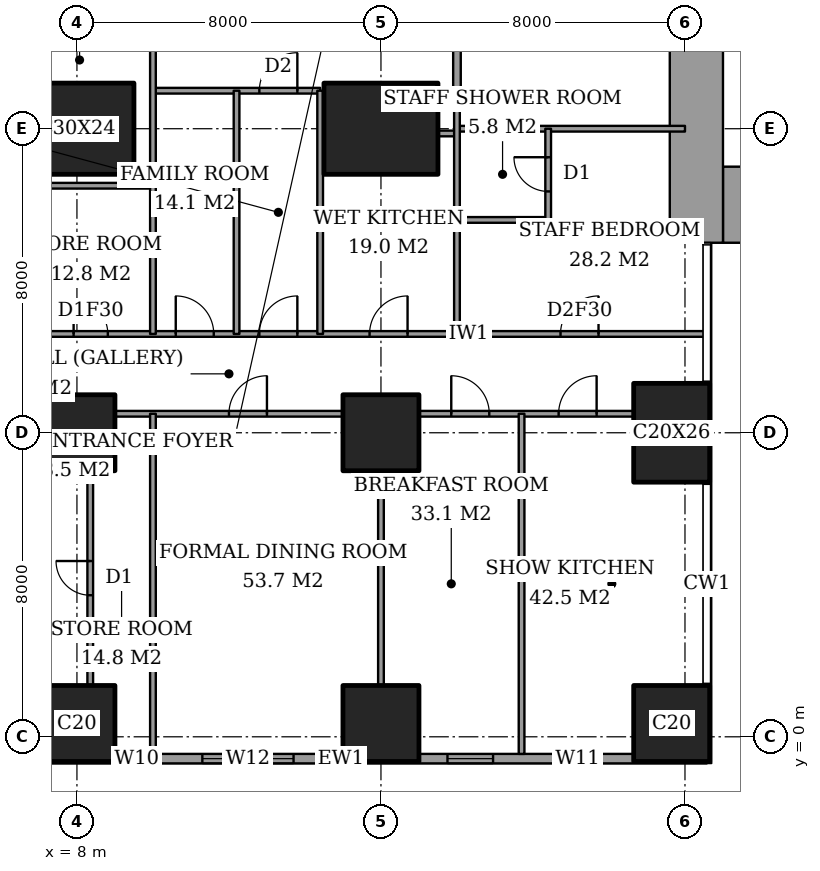
"""IFC4 building model, lengths in metres.
Left out: names, types, materials, properties, quantities, classifications, styles, units other than length and angle.
Written with IfcOpenShell. Run it as: python <this file> out.ifc"""

import sys

from ifc_helpers import new_model, si_unit, direction, frame, frame_2d, origin, origin_2d, place, context, subcontext, project, spatial, rectangle, extrude, element, fill, save


model = new_model("IFC4")
c1 = context("Model", 3, precision=1e-05, world=origin(), true_north=direction((0.0, 1.0)))
c2 = subcontext(c1, "Body", "Model", "MODEL_VIEW")
j1 = project(units=[si_unit("LENGTHUNIT", "METRE"), si_unit("PLANEANGLEUNIT", "RADIAN")], contexts=[c1])
p1 = place(None, origin())
s1 = spatial("IfcSite", under=j1, at=p1, CompositionType="ELEMENT")
p2 = place(p1, origin())
s2 = spatial("IfcBuilding", under=s1, at=p2, CompositionType="ELEMENT")
p3 = place(p2, frame((0.0, 0.0, 125.0)))
s3 = spatial("IfcBuildingStorey", under=s2, at=p3, CompositionType="ELEMENT", Elevation=125.0)
for number, where, z_axis, x_axis in (
    (1, (8.0, 0.35, 0.0), (0.0, 0.0, 1.0), (1.0, 0.0, 0.0)),
    (2, (8.0, 8.0, 0.0), (0.0, 0.0, 1.0), (1.0, 0.0, 0.0)),
):
    element("IfcColumn", number, at=place(p3, frame(where, z_axis=z_axis, x_axis=x_axis)), inside=s3, PredefinedType="COLUMN", context=c2, shape_type="SweptSolid", body=[
        extrude(rectangle(XDim=2.0, YDim=2.0, at=origin_2d()), origin(), (0.0, 0.0, 1.0), 3.6),
    ])
p4 = place(p3, frame((8.0, 16.0, 0.0), z_axis=(0.0, 0.0, 1.0), x_axis=(1.0, 0.0, 0.0)))
e3 = element("IfcColumn", 3, at=p4, inside=s3, PredefinedType="COLUMN", context=c2, shape_type="SweptSolid", body=[
    extrude(rectangle(XDim=3.0, YDim=2.4, at=origin_2d()), origin(), (0.0, 0.0, 1.0), 3.6),
])
for number, where, z_axis, x_axis in (
    (4, (16.0, 0.35, 0.0), (0.0, 0.0, 1.0), (1.0, 0.0, 0.0)),
    (5, (16.0, 8.0, 0.0), (0.0, 0.0, 1.0), (1.0, 0.0, 0.0)),
):
    element("IfcColumn", number, at=place(p3, frame(where, z_axis=z_axis, x_axis=x_axis)), inside=s3, PredefinedType="COLUMN", context=c2, shape_type="SweptSolid", body=[
        extrude(rectangle(XDim=2.0, YDim=2.0, at=origin_2d()), origin(), (0.0, 0.0, 1.0), 3.6),
    ])
p5 = place(p3, frame((16.0, 16.0, 0.0), z_axis=(0.0, 0.0, 1.0), x_axis=(1.0, 0.0, 0.0)))
e6 = element("IfcColumn", 6, at=p5, inside=s3, PredefinedType="COLUMN", context=c2, shape_type="SweptSolid", body=[
    extrude(rectangle(XDim=3.0, YDim=2.4, at=origin_2d()), origin(), (0.0, 0.0, 1.0), 3.6),
])
p6 = place(p3, frame((23.65, 0.35, 0.0), z_axis=(0.0, 0.0, 1.0), x_axis=(1.0, 0.0, 0.0)))
e7 = element("IfcColumn", 7, at=p6, inside=s3, PredefinedType="COLUMN", context=c2, shape_type="SweptSolid", body=[
    extrude(rectangle(XDim=2.0, YDim=2.0, at=origin_2d()), origin(), (0.0, 0.0, 1.0), 3.6),
])
p7 = place(p3, frame((23.65, 8.0, 0.0), z_axis=(0.0, 0.0, 1.0), x_axis=(1.0, 0.0, 0.0)))
e8 = element("IfcColumn", 8, at=p7, inside=s3, PredefinedType="COLUMN", context=c2, shape_type="SweptSolid", body=[
    extrude(rectangle(XDim=2.0, YDim=2.6, at=origin_2d()), origin(), (0.0, 0.0, 1.0), 3.6),
])
p8 = place(p3, frame((25.0, 14.0, 0.0), z_axis=(0.0, 0.0, 1.0), x_axis=(1.0, 0.0, 0.0)))
e9 = element("IfcWall", 9, at=p8, inside=s3, PredefinedType="SHEAR", context=c2, shape_type="SweptSolid", body=[
    extrude(rectangle(XDim=3.15, YDim=2.0, at=frame_2d((1.575, 0.0))), origin(), (0.0, 0.0, 1.0), 3.6),
])
p9 = place(p3, frame((24.3, 13.0, 0.0), z_axis=(0.0, 0.0, 1.0), x_axis=(0.0, 1.0, 0.0)))
e10 = element("IfcWall", 10, at=p9, inside=s3, PredefinedType="SHEAR", context=c2, shape_type="SweptSolid", body=[
    extrude(rectangle(XDim=10.15, YDim=1.4, at=frame_2d((5.075, 0.0))), origin(), (0.0, 0.0, 1.0), 3.6),
])
p10 = place(p3, frame((3.175, -0.575, 0.0), z_axis=(0.0, 0.0, 1.0), x_axis=(1.0, 0.0, 0.0)))
e11 = element("IfcWall", 11, at=p10, inside=s3, PredefinedType="SOLIDWALL", context=c2, shape_type="SweptSolid", body=[
    extrude(rectangle(XDim=21.4, YDim=0.25, at=frame_2d((10.7, 0.0))), origin(), (0.0, 0.0, 1.0), 3.6),
])
p11 = place(p10, frame((0.775, 0.0, 0.4)))
e12 = element("IfcOpeningElement", 12, at=p11, cuts=e11, PredefinedType="OPENING", context=c2, shape_type="SweptSolid", body=[
    extrude(rectangle(XDim=2.4, YDim=2.2, at=frame_2d((1.2, 1.1))), frame((0.0, 0.135, 0.0), z_axis=(0.0, -1.0, 0.0), x_axis=(1.0, 0.0, 0.0)), (0.0, 0.0, 1.0), 0.27),
])
p12 = place(p10, frame((6.1, 0.0, 0.4)))
e13 = element("IfcOpeningElement", 13, at=p12, cuts=e11, PredefinedType="OPENING", context=c2, shape_type="SweptSolid", body=[
    extrude(rectangle(XDim=0.6, YDim=2.2, at=frame_2d((0.3, 1.1))), frame((0.0, 0.135, 0.0), z_axis=(0.0, -1.0, 0.0), x_axis=(1.0, 0.0, 0.0)), (0.0, 0.0, 1.0), 0.27),
])
p13 = place(p10, frame((8.125, 0.0, 0.4)))
e14 = element("IfcOpeningElement", 14, at=p13, cuts=e11, PredefinedType="OPENING", context=c2, shape_type="SweptSolid", body=[
    extrude(rectangle(XDim=2.4, YDim=2.2, at=frame_2d((1.2, 1.1))), frame((0.0, 0.135, 0.0), z_axis=(0.0, -1.0, 0.0), x_axis=(1.0, 0.0, 0.0)), (0.0, 0.0, 1.0), 0.27),
])
p14 = place(p10, frame((14.575, 0.0, 0.4)))
e15 = element("IfcOpeningElement", 15, at=p14, cuts=e11, PredefinedType="OPENING", context=c2, shape_type="SweptSolid", body=[
    extrude(rectangle(XDim=1.2, YDim=2.2, at=frame_2d((0.6, 1.1))), frame((0.0, 0.135, 0.0), z_axis=(0.0, -1.0, 0.0), x_axis=(1.0, 0.0, 0.0)), (0.0, 0.0, 1.0), 0.27),
])
p15 = place(p10, frame((17.4, 0.0, 0.4)))
e16 = element("IfcOpeningElement", 16, at=p15, cuts=e11, PredefinedType="OPENING", context=c2, shape_type="SweptSolid", body=[
    extrude(rectangle(XDim=1.2, YDim=2.2, at=frame_2d((0.6, 1.1))), frame((0.0, 0.135, 0.0), z_axis=(0.0, -1.0, 0.0), x_axis=(1.0, 0.0, 0.0)), (0.0, 0.0, 1.0), 0.27),
])
p16 = place(p3, frame((9.0, 8.5, 0.0), z_axis=(0.0, 0.0, 1.0), x_axis=(1.0, 0.0, 0.0)))
e17 = element("IfcWall", 17, at=p16, inside=s3, PredefinedType="PARTITIONING", context=c2, shape_type="SweptSolid", body=[
    extrude(rectangle(XDim=6.0, YDim=0.15, at=frame_2d((3.0, 0.0))), origin(), (0.0, 0.0, 1.0), 3.35),
])
p17 = place(p16, frame((3.0, 0.0, 0.0)))
e18 = element("IfcOpeningElement", 18, at=p17, cuts=e17, PredefinedType="OPENING", context=c2, shape_type="SweptSolid", body=[
    extrude(rectangle(XDim=1.0, YDim=2.1, at=frame_2d((0.5, 1.05))), frame((0.0, 0.085, 0.0), z_axis=(0.0, -1.0, 0.0), x_axis=(1.0, 0.0, 0.0)), (0.0, 0.0, 1.0), 0.17),
])
p18 = place(p3, frame((17.0, 8.5, 0.0), z_axis=(0.0, 0.0, 1.0), x_axis=(1.0, 0.0, 0.0)))
e19 = element("IfcWall", 19, at=p18, inside=s3, PredefinedType="PARTITIONING", context=c2, shape_type="SweptSolid", body=[
    extrude(rectangle(XDim=5.65, YDim=0.15, at=frame_2d((2.825, 0.0))), origin(), (0.0, 0.0, 1.0), 3.35),
])
p19 = place(p18, frame((0.85, 0.0, 0.0)))
e20 = element("IfcOpeningElement", 20, at=p19, cuts=e19, PredefinedType="OPENING", context=c2, shape_type="SweptSolid", body=[
    extrude(rectangle(XDim=1.0, YDim=2.1, at=frame_2d((0.5, 1.05))), frame((0.0, 0.085, 0.0), z_axis=(0.0, -1.0, 0.0), x_axis=(1.0, 0.0, 0.0)), (0.0, 0.0, 1.0), 0.17),
])
p20 = place(p18, frame((3.675, 0.0, 0.0)))
e21 = element("IfcOpeningElement", 21, at=p20, cuts=e19, PredefinedType="OPENING", context=c2, shape_type="SweptSolid", body=[
    extrude(rectangle(XDim=1.0, YDim=2.1, at=frame_2d((0.5, 1.05))), frame((0.0, 0.085, 0.0), z_axis=(0.0, -1.0, 0.0), x_axis=(1.0, 0.0, 0.0)), (0.0, 0.0, 1.0), 0.17),
])
p21 = place(p3, frame((-0.45, 10.6, 0.0), z_axis=(0.0, 0.0, 1.0), x_axis=(1.0, 0.0, 0.0)))
e22 = element("IfcWall", 22, at=p21, inside=s3, PredefinedType="PARTITIONING", context=c2, shape_type="SweptSolid", body=[
    extrude(rectangle(XDim=25.011, YDim=0.15, at=frame_2d((12.505, 0.0))), origin(), (0.0, 0.0, 1.0), 3.35),
])
p22 = place(p21, frame((13.25, 0.0, 0.0)))
e23 = element("IfcOpeningElement", 23, at=p22, cuts=e22, PredefinedType="OPENING", context=c2, shape_type="SweptSolid", body=[
    extrude(rectangle(XDim=1.0, YDim=2.1, at=frame_2d((0.5, 1.05))), frame((0.0, 0.085, 0.0), z_axis=(0.0, -1.0, 0.0), x_axis=(1.0, 0.0, 0.0)), (0.0, 0.0, 1.0), 0.17),
])
p23 = place(p21, frame((3.087, 0.0, 0.0)))
e24 = element("IfcOpeningElement", 24, at=p23, cuts=e22, PredefinedType="OPENING", context=c2, shape_type="SweptSolid", body=[
    extrude(rectangle(XDim=1.0, YDim=2.1, at=frame_2d((0.5, 1.05))), frame((0.0, 0.085, 0.0), z_axis=(0.0, -1.0, 0.0), x_axis=(1.0, 0.0, 0.0)), (0.0, 0.0, 1.0), 0.17),
])
p24 = place(p21, frame((8.363, 0.0, 0.0)))
e25 = element("IfcOpeningElement", 25, at=p24, cuts=e22, PredefinedType="OPENING", context=c2, shape_type="SweptSolid", body=[
    extrude(rectangle(XDim=0.9, YDim=2.1, at=frame_2d((0.45, 1.05))), frame((0.0, 0.085, 0.0), z_axis=(0.0, -1.0, 0.0), x_axis=(1.0, 0.0, 0.0)), (0.0, 0.0, 1.0), 0.17),
])
p25 = place(p21, frame((11.05, 0.0, 0.0)))
e26 = element("IfcOpeningElement", 26, at=p25, cuts=e22, PredefinedType="OPENING", context=c2, shape_type="SweptSolid", body=[
    extrude(rectangle(XDim=1.0, YDim=2.1, at=frame_2d((0.5, 1.05))), frame((0.0, 0.085, 0.0), z_axis=(0.0, -1.0, 0.0), x_axis=(1.0, 0.0, 0.0)), (0.0, 0.0, 1.0), 0.17),
])
p26 = place(p21, frame((16.15, 0.0, 0.0)))
e27 = element("IfcOpeningElement", 27, at=p26, cuts=e22, PredefinedType="OPENING", context=c2, shape_type="SweptSolid", body=[
    extrude(rectangle(XDim=1.0, YDim=2.1, at=frame_2d((0.5, 1.05))), frame((0.0, 0.085, 0.0), z_axis=(0.0, -1.0, 0.0), x_axis=(1.0, 0.0, 0.0)), (0.0, 0.0, 1.0), 0.17),
])
p27 = place(p21, frame((21.175, 0.0, 0.0)))
e28 = element("IfcOpeningElement", 28, at=p27, cuts=e22, PredefinedType="OPENING", context=c2, shape_type="SweptSolid", body=[
    extrude(rectangle(XDim=1.0, YDim=2.1, at=frame_2d((0.5, 1.05))), frame((0.0, 0.085, 0.0), z_axis=(0.0, -1.0, 0.0), x_axis=(1.0, 0.0, 0.0)), (0.0, 0.0, 1.0), 0.17),
])
p28 = place(p3, frame((18.0, 13.6, 0.0), z_axis=(0.0, 0.0, 1.0), x_axis=(1.0, 0.0, 0.0)))
e29 = element("IfcWall", 29, at=p28, inside=s3, PredefinedType="PARTITIONING", context=c2, shape_type="SweptSolid", body=[
    extrude(rectangle(XDim=2.4, YDim=0.15, at=frame_2d((1.2, 0.0))), origin(), (0.0, 0.0, 1.0), 3.35),
])
p29 = place(p3, frame((6.725, 14.5, 0.0), z_axis=(0.0, 0.0, 1.0), x_axis=(1.0, 0.0, 0.0)))
e30 = element("IfcWall", 30, at=p29, inside=s3, PredefinedType="PARTITIONING", context=c2, shape_type="SweptSolid", body=[
    extrude(rectangle(XDim=3.275, YDim=0.15, at=frame_2d((1.637, 0.0))), origin(), (0.0, 0.0, 1.0), 3.35),
])
p30 = place(p3, frame((17.5, 15.875, 0.0), z_axis=(0.0, 0.0, 1.0), x_axis=(1.0, 0.0, 0.0)))
e31 = element("IfcWall", 31, at=p30, inside=s3, PredefinedType="PARTITIONING", context=c2, shape_type="SweptSolid", body=[
    extrude(rectangle(XDim=0.5, YDim=0.15, at=frame_2d((0.25, 0.0))), origin(), (0.0, 0.0, 1.0), 2.634),
])
p31 = place(p3, frame((18.0, 16.0, 0.0), z_axis=(0.0, 0.0, 1.0), x_axis=(1.0, 0.0, 0.0)))
e32 = element("IfcWall", 32, at=p31, inside=s3, PredefinedType="PARTITIONING", context=c2, shape_type="SweptSolid", body=[
    extrude(rectangle(XDim=6.0, YDim=0.15, at=frame_2d((3.0, 0.0))), origin(), (0.0, 0.0, 1.0), 2.634),
])
p32 = place(p3, frame((10.0, 17.0, 0.0), z_axis=(0.0, 0.0, 1.0), x_axis=(1.0, 0.0, 0.0)))
e33 = element("IfcWall", 33, at=p32, inside=s3, PredefinedType="PARTITIONING", context=c2, shape_type="SweptSolid", body=[
    extrude(rectangle(XDim=4.4, YDim=0.15, at=frame_2d((2.2, 0.0))), origin(), (0.0, 0.0, 1.0), 3.35),
])
p33 = place(p32, frame((2.8, 0.0, 0.0)))
e34 = element("IfcOpeningElement", 34, at=p33, cuts=e33, PredefinedType="OPENING", context=c2, shape_type="SweptSolid", body=[
    extrude(rectangle(XDim=1.0, YDim=2.1, at=frame_2d((0.5, 1.05))), frame((0.0, 0.085, 0.0), z_axis=(0.0, -1.0, 0.0), x_axis=(1.0, 0.0, 0.0)), (0.0, 0.0, 1.0), 0.17),
])
p34 = place(p3, frame((8.35, 1.35, 0.0), z_axis=(0.0, 0.0, 1.0), x_axis=(0.0, 1.0, 0.0)))
e35 = element("IfcWall", 35, at=p34, inside=s3, PredefinedType="PARTITIONING", context=c2, shape_type="SweptSolid", body=[
    extrude(rectangle(XDim=5.65, YDim=0.15, at=frame_2d((2.825, 0.0))), origin(), (0.0, 0.0, 1.0), 3.35),
])
p35 = place(p34, frame((2.375, 0.0, 0.0)))
e36 = element("IfcOpeningElement", 36, at=p35, cuts=e35, PredefinedType="OPENING", context=c2, shape_type="SweptSolid", body=[
    extrude(rectangle(XDim=0.9, YDim=2.1, at=frame_2d((0.45, 1.05))), frame((0.0, 0.085, 0.0), z_axis=(0.0, -1.0, 0.0), x_axis=(1.0, 0.0, 0.0)), (0.0, 0.0, 1.0), 0.17),
])
p36 = place(p3, frame((10.0, -0.45, 0.0), z_axis=(0.0, 0.0, 1.0), x_axis=(0.0, 1.0, 0.0)))
e37 = element("IfcWall", 37, at=p36, inside=s3, PredefinedType="PARTITIONING", context=c2, shape_type="SweptSolid", body=[
    extrude(rectangle(XDim=8.95, YDim=0.15, at=frame_2d((4.475, 0.0))), origin(), (0.0, 0.0, 1.0), 3.35),
])
p37 = place(p3, frame((10.0, 10.6, 0.0), z_axis=(0.0, 0.0, 1.0), x_axis=(0.0, 1.0, 0.0)))
e38 = element("IfcWall", 38, at=p37, inside=s3, PredefinedType="PARTITIONING", context=c2, shape_type="SweptSolid", body=[
    extrude(rectangle(XDim=11.0, YDim=0.15, at=frame_2d((5.5, 0.0))), origin(), (0.0, 0.0, 1.0), 3.35),
])
p38 = place(p37, frame((8.2, 0.0, 0.0)))
e39 = element("IfcOpeningElement", 39, at=p38, cuts=e38, PredefinedType="OPENING", context=c2, shape_type="SweptSolid", body=[
    extrude(rectangle(XDim=1.0, YDim=2.1, at=frame_2d((0.5, 1.05))), frame((0.0, 0.085, 0.0), z_axis=(0.0, -1.0, 0.0), x_axis=(1.0, 0.0, 0.0)), (0.0, 0.0, 1.0), 0.17),
])
for number, where, z_axis, x_axis in (
    (40, (12.2, 10.6, 0.0), (0.0, 0.0, 1.0), (0.0, 1.0, 0.0)),
    (41, (14.4, 10.6, 0.0), (0.0, 0.0, 1.0), (0.0, 1.0, 0.0)),
):
    element("IfcWall", number, at=place(p3, frame(where, z_axis=z_axis, x_axis=x_axis)), inside=s3, PredefinedType="PARTITIONING", context=c2, shape_type="SweptSolid", body=[
        extrude(rectangle(XDim=6.4, YDim=0.15, at=frame_2d((3.2, 0.0))), origin(), (0.0, 0.0, 1.0), 3.35),
    ])
p39 = place(p3, frame((16.0, 1.35, 0.0), z_axis=(0.0, 0.0, 1.0), x_axis=(0.0, 1.0, 0.0)))
e42 = element("IfcWall", 42, at=p39, inside=s3, PredefinedType="PARTITIONING", context=c2, shape_type="SweptSolid", body=[
    extrude(rectangle(XDim=5.65, YDim=0.15, at=frame_2d((2.825, 0.0))), origin(), (0.0, 0.0, 1.0), 3.35),
])
p40 = place(p3, frame((18.0, 17.0, 0.0), z_axis=(0.0, 0.0, 1.0), x_axis=(0.0, 1.0, 0.0)))
e43 = element("IfcWall", 43, at=p40, inside=s3, PredefinedType="PARTITIONING", context=c2, shape_type="SweptSolid", body=[
    extrude(rectangle(XDim=7.0, YDim=0.2, at=frame_2d((3.5, 0.0))), origin(), (0.0, 0.0, 1.0), 3.35),
])
p41 = place(p40, frame((4.4, 0.0, 0.0)))
e44 = element("IfcOpeningElement", 44, at=p41, cuts=e43, PredefinedType="OPENING", context=c2, shape_type="SweptSolid", body=[
    extrude(rectangle(XDim=1.2, YDim=2.4, at=frame_2d((0.6, 1.2))), frame((0.0, 0.11, 0.0), z_axis=(0.0, -1.0, 0.0), x_axis=(1.0, 0.0, 0.0)), (0.0, 0.0, 1.0), 0.22),
])
p42 = place(p40, frame((1.05, 0.0, 0.0)))
e45 = element("IfcOpeningElement", 45, at=p42, cuts=e43, PredefinedType="OPENING", context=c2, shape_type="SweptSolid", body=[
    extrude(rectangle(XDim=0.9, YDim=2.1, at=frame_2d((0.45, 1.05))), frame((0.0, 0.11, 0.0), z_axis=(0.0, -1.0, 0.0), x_axis=(1.0, 0.0, 0.0)), (0.0, 0.0, 1.0), 0.22),
])
p43 = place(p3, frame((18.0, 10.6, 0.0), z_axis=(0.0, 0.0, 1.0), x_axis=(0.0, 1.0, 0.0)))
e46 = element("IfcWall", 46, at=p43, inside=s3, PredefinedType="PARTITIONING", context=c2, shape_type="SweptSolid", body=[
    extrude(rectangle(XDim=6.4, YDim=0.15, at=frame_2d((3.2, 0.0))), origin(), (0.0, 0.0, 1.0), 3.35),
])
p44 = place(p3, frame((19.7, -0.45, 0.0), z_axis=(0.0, 0.0, 1.0), x_axis=(0.0, 1.0, 0.0)))
e47 = element("IfcWall", 47, at=p44, inside=s3, PredefinedType="PARTITIONING", context=c2, shape_type="SweptSolid", body=[
    extrude(rectangle(XDim=8.95, YDim=0.15, at=frame_2d((4.475, 0.0))), origin(), (0.0, 0.0, 1.0), 3.35),
])
p45 = place(p3, frame((20.4, 13.6, 0.0), z_axis=(0.0, 0.0, 1.0), x_axis=(0.0, 1.0, 0.0)))
e48 = element("IfcWall", 48, at=p45, inside=s3, PredefinedType="PARTITIONING", context=c2, shape_type="SweptSolid", body=[
    extrude(rectangle(XDim=2.4, YDim=0.15, at=frame_2d((1.2, 0.0))), origin(), (0.0, 0.0, 1.0), 3.35),
])
p46 = place(p45, frame((0.75, 0.0, 0.0)))
e49 = element("IfcOpeningElement", 49, at=p46, cuts=e48, PredefinedType="OPENING", context=c2, shape_type="SweptSolid", body=[
    extrude(rectangle(XDim=0.9, YDim=2.1, at=frame_2d((0.45, 1.05))), frame((0.0, 0.085, 0.0), z_axis=(0.0, -1.0, 0.0), x_axis=(1.0, 0.0, 0.0)), (0.0, 0.0, 1.0), 0.17),
])
p47 = place(p12, origin())
e50 = element("IfcWindow", 50, at=p47, inside=s3, PartitioningType="SINGLE_PANEL", PredefinedType="WINDOW", context=c2, shape_type="SweptSolid", body=[
    extrude(rectangle(XDim=0.6, YDim=2.2, at=frame_2d((0.3, 1.1))), frame((0.0, 0.03, 0.0), z_axis=(0.0, -1.0, 0.0), x_axis=(1.0, 0.0, 0.0)), (0.0, 0.0, 1.0), 0.06),
])
fill(e13, e50)
p48 = place(p13, origin())
e51 = element("IfcWindow", 51, at=p48, inside=s3, PartitioningType="SINGLE_PANEL", PredefinedType="WINDOW", context=c2, shape_type="SweptSolid", body=[
    extrude(rectangle(XDim=2.4, YDim=2.2, at=frame_2d((1.2, 1.1))), frame((0.0, 0.03, 0.0), z_axis=(0.0, -1.0, 0.0), x_axis=(1.0, 0.0, 0.0)), (0.0, 0.0, 1.0), 0.06),
])
fill(e14, e51)
p49 = place(p14, origin())
e52 = element("IfcWindow", 52, at=p49, inside=s3, PartitioningType="SINGLE_PANEL", PredefinedType="WINDOW", context=c2, shape_type="SweptSolid", body=[
    extrude(rectangle(XDim=1.2, YDim=2.2, at=frame_2d((0.6, 1.1))), frame((0.0, 0.03, 0.0), z_axis=(0.0, -1.0, 0.0), x_axis=(1.0, 0.0, 0.0)), (0.0, 0.0, 1.0), 0.06),
])
fill(e15, e52)
p50 = place(p15, origin())
e53 = element("IfcWindow", 53, at=p50, inside=s3, PartitioningType="SINGLE_PANEL", PredefinedType="WINDOW", context=c2, shape_type="SweptSolid", body=[
    extrude(rectangle(XDim=1.2, YDim=2.2, at=frame_2d((0.6, 1.1))), frame((0.0, 0.03, 0.0), z_axis=(0.0, -1.0, 0.0), x_axis=(1.0, 0.0, 0.0)), (0.0, 0.0, 1.0), 0.06),
])
fill(e16, e53)
p51 = place(p35, origin())
e54 = element("IfcDoor", 54, at=p51, inside=s3, OperationType="SINGLE_SWING_LEFT", PredefinedType="DOOR", context=c2, shape_type="SweptSolid", body=[
    extrude(rectangle(XDim=0.9, YDim=2.1, at=frame_2d((0.45, 1.05))), frame((0.0, 0.025, 0.0), z_axis=(0.0, -1.0, 0.0), x_axis=(1.0, 0.0, 0.0)), (0.0, 0.0, 1.0), 0.05),
])
fill(e36, e54)
p52 = place(p17, origin())
e55 = element("IfcDoor", 55, at=p52, inside=s3, OperationType="SINGLE_SWING_LEFT", PredefinedType="DOOR", context=c2, shape_type="SweptSolid", body=[
    extrude(rectangle(XDim=1.0, YDim=2.1, at=frame_2d((0.5, 1.05))), frame((0.0, 0.025, 0.0), z_axis=(0.0, -1.0, 0.0), x_axis=(1.0, 0.0, 0.0)), (0.0, 0.0, 1.0), 0.05),
])
fill(e18, e55)
p53 = place(p19, origin())
e56 = element("IfcDoor", 56, at=p53, inside=s3, OperationType="SINGLE_SWING_RIGHT", PredefinedType="DOOR", context=c2, shape_type="SweptSolid", body=[
    extrude(rectangle(XDim=1.0, YDim=2.1, at=frame_2d((0.5, 1.05))), frame((0.0, 0.025, 0.0), z_axis=(0.0, -1.0, 0.0), x_axis=(1.0, 0.0, 0.0)), (0.0, 0.0, 1.0), 0.05),
])
fill(e20, e56)
p54 = place(p20, origin())
e57 = element("IfcDoor", 57, at=p54, inside=s3, OperationType="SINGLE_SWING_LEFT", PredefinedType="DOOR", context=c2, shape_type="SweptSolid", body=[
    extrude(rectangle(XDim=1.0, YDim=2.1, at=frame_2d((0.5, 1.05))), frame((0.0, 0.025, 0.0), z_axis=(0.0, -1.0, 0.0), x_axis=(1.0, 0.0, 0.0)), (0.0, 0.0, 1.0), 0.05),
])
fill(e21, e57)
p55 = place(p22, origin())
e58 = element("IfcDoor", 58, at=p55, inside=s3, OperationType="SINGLE_SWING_LEFT", PredefinedType="DOOR", context=c2, shape_type="SweptSolid", body=[
    extrude(rectangle(XDim=1.0, YDim=2.1, at=frame_2d((0.5, 1.05))), frame((0.0, 0.025, 0.0), z_axis=(0.0, -1.0, 0.0), x_axis=(1.0, 0.0, 0.0)), (0.0, 0.0, 1.0), 0.05),
])
fill(e23, e58)
p56 = place(p24, origin())
e59 = element("IfcDoor", 59, at=p56, inside=s3, OperationType="SINGLE_SWING_RIGHT", PredefinedType="DOOR", context=c2, shape_type="SweptSolid", body=[
    extrude(rectangle(XDim=0.9, YDim=2.1, at=frame_2d((0.45, 1.05))), frame((0.0, 0.025, 0.0), z_axis=(0.0, -1.0, 0.0), x_axis=(1.0, 0.0, 0.0)), (0.0, 0.0, 1.0), 0.05),
])
fill(e25, e59)
p57 = place(p25, origin())
e60 = element("IfcDoor", 60, at=p57, inside=s3, OperationType="SINGLE_SWING_RIGHT", PredefinedType="DOOR", context=c2, shape_type="SweptSolid", body=[
    extrude(rectangle(XDim=1.0, YDim=2.1, at=frame_2d((0.5, 1.05))), frame((0.0, 0.025, 0.0), z_axis=(0.0, -1.0, 0.0), x_axis=(1.0, 0.0, 0.0)), (0.0, 0.0, 1.0), 0.05),
])
fill(e26, e60)
p58 = place(p33, origin())
e61 = element("IfcDoor", 61, at=p58, inside=s3, OperationType="SINGLE_SWING_LEFT", PredefinedType="DOOR", context=c2, shape_type="SweptSolid", body=[
    extrude(rectangle(XDim=1.0, YDim=2.1, at=frame_2d((0.5, 1.05))), frame((0.0, 0.025, 0.0), z_axis=(0.0, -1.0, 0.0), x_axis=(1.0, 0.0, 0.0)), (0.0, 0.0, 1.0), 0.05),
])
fill(e34, e61)
p59 = place(p26, origin())
e62 = element("IfcDoor", 62, at=p59, inside=s3, OperationType="SINGLE_SWING_LEFT", PredefinedType="DOOR", context=c2, shape_type="SweptSolid", body=[
    extrude(rectangle(XDim=1.0, YDim=2.1, at=frame_2d((0.5, 1.05))), frame((0.0, 0.025, 0.0), z_axis=(0.0, -1.0, 0.0), x_axis=(1.0, 0.0, 0.0)), (0.0, 0.0, 1.0), 0.05),
])
fill(e27, e62)
p60 = place(p46, origin())
e63 = element("IfcDoor", 63, at=p60, inside=s3, OperationType="SINGLE_SWING_LEFT", PredefinedType="DOOR", context=c2, shape_type="SweptSolid", body=[
    extrude(rectangle(XDim=0.9, YDim=2.1, at=frame_2d((0.45, 1.05))), frame((0.0, 0.025, 0.0), z_axis=(0.0, -1.0, 0.0), x_axis=(1.0, 0.0, 0.0)), (0.0, 0.0, 1.0), 0.05),
])
fill(e49, e63)
p61 = place(p27, origin())
e64 = element("IfcDoor", 64, at=p61, inside=s3, OperationType="SINGLE_SWING_LEFT", PredefinedType="DOOR", context=c2, shape_type="SweptSolid", body=[
    extrude(rectangle(XDim=1.0, YDim=2.1, at=frame_2d((0.5, 1.05))), frame((0.0, 0.025, 0.0), z_axis=(0.0, -1.0, 0.0), x_axis=(1.0, 0.0, 0.0)), (0.0, 0.0, 1.0), 0.05),
])
fill(e28, e64)
save(model, sys.argv[1])
